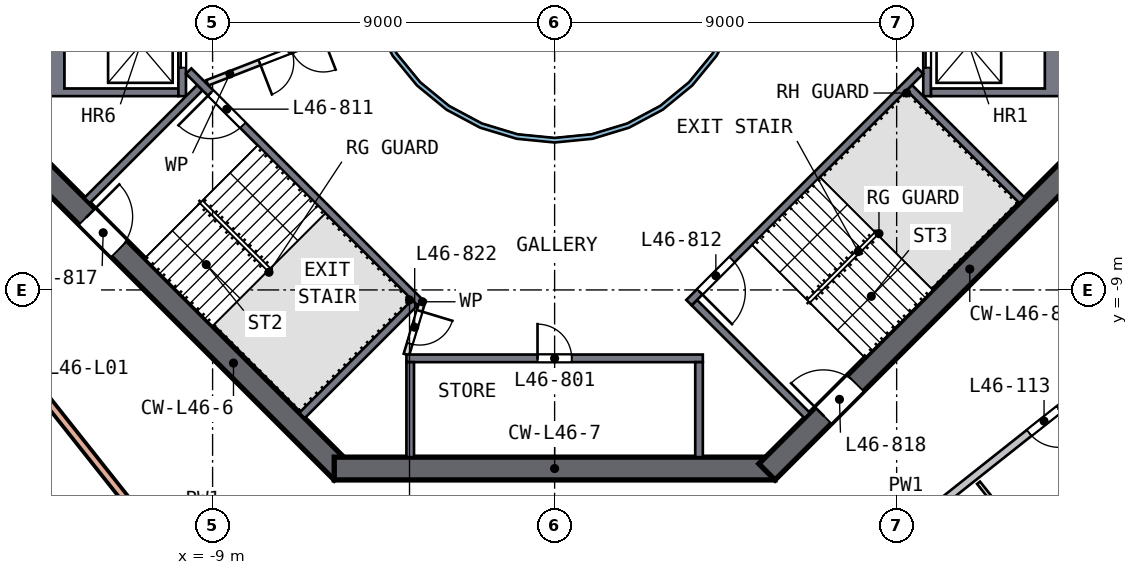
"""IFC4 building model, lengths in metres.
Left out: names, types, materials, properties, quantities, classifications, styles, units other than length and angle.
Written with IfcOpenShell. Run it as: python <this file> out.ifc"""

import sys

from ifc_helpers import new_model, si_unit, direction, frame, frame_2d, origin, place, context, subcontext, project, spatial, polyline, rectangle, outline, extrude, element, fill, save


model = new_model("IFC4")
c1 = context("Model", 3, precision=1e-05, world=origin(), true_north=direction((0.0, 1.0)))
c2 = subcontext(c1, "Body", "Model", "MODEL_VIEW")
j1 = project(units=[si_unit("LENGTHUNIT", "METRE"), si_unit("PLANEANGLEUNIT", "RADIAN")], contexts=[c1])
p1 = place(None, origin())
s1 = spatial("IfcSite", under=j1, at=p1, CompositionType="ELEMENT")
p2 = place(p1, origin())
s2 = spatial("IfcBuilding", under=s1, at=p2, CompositionType="ELEMENT")
p3 = place(p2, frame((0.0, 0.0, 190.5)))
s3 = spatial("IfcBuildingStorey", under=s2, at=p3, CompositionType="ELEMENT", Elevation=190.5)
p4 = place(p3, frame((-13.788, -5.587, 0.0), z_axis=(0.0, 0.0, 1.0), x_axis=(0.707106781, -0.707106781, 0.0)))
e1 = element("IfcWall", 1, at=p4, inside=s3, PredefinedType="SHEAR", context=c2, shape_type="SweptSolid", body=[
    extrude(rectangle(XDim=11.598, YDim=0.6, at=frame_2d((5.799, 0.0))), origin(), (0.0, 0.0, 1.0), 3.5),
])
p5 = place(p4, frame((2.099, 0.0, 0.0)))
e2 = element("IfcOpeningElement", 2, at=p5, cuts=e1, PredefinedType="OPENING", context=c2, shape_type="SweptSolid", body=[
    extrude(rectangle(XDim=1.2, YDim=2.1, at=frame_2d((0.6, 1.05))), frame((0.0, 0.31, 0.0), z_axis=(0.0, -1.0, 0.0), x_axis=(1.0, 0.0, 0.0)), (0.0, 0.0, 1.0), 0.62),
])
p6 = place(p3, frame((-5.799, -13.7, 0.0), z_axis=(0.0, 0.0, 1.0), x_axis=(1.0, 0.0, 0.0)))
e3 = element("IfcWall", 3, at=p6, inside=s3, PredefinedType="SHEAR", context=c2, shape_type="SweptSolid", body=[
    extrude(rectangle(XDim=11.598, YDim=0.6, at=frame_2d((5.799, 0.0))), origin(), (0.0, 0.0, 1.0), 3.5),
])
p7 = place(p3, frame((5.587, -13.788, 0.0), z_axis=(0.0, 0.0, 1.0), x_axis=(0.707106781, 0.707106781, 0.0)))
e4 = element("IfcWall", 4, at=p7, inside=s3, PredefinedType="SHEAR", context=c2, shape_type="SweptSolid", body=[
    extrude(rectangle(XDim=11.598, YDim=0.6, at=frame_2d((5.799, 0.0))), origin(), (0.0, 0.0, 1.0), 3.5),
])
p8 = place(p7, frame((2.099, 0.0, 0.0)))
e5 = element("IfcOpeningElement", 5, at=p8, cuts=e4, PredefinedType="OPENING", context=c2, shape_type="SweptSolid", body=[
    extrude(rectangle(XDim=1.2, YDim=2.1, at=frame_2d((0.6, 1.05))), frame((0.0, 0.31, 0.0), z_axis=(0.0, -1.0, 0.0), x_axis=(1.0, 0.0, 0.0)), (0.0, 0.0, 1.0), 0.62),
])
p9 = place(p3, frame((-9.958, -16.187, 0.0), z_axis=(0.0, 0.0, 1.0), x_axis=(-0.621141056, 0.783698787, 0.0)))
e6 = element("IfcWall", 6, at=p9, inside=s3, PredefinedType="SOLIDWALL", context=c2, shape_type="SweptSolid", body=[
    extrude(rectangle(XDim=13.0, YDim=0.2, at=frame_2d((6.5, 0.0))), origin(), (0.0, 0.0, 1.0), 3.19),
])
p10 = place(p9, frame((5.6, 0.0, 0.0)))
e7 = element("IfcOpeningElement", 7, at=p10, cuts=e6, PredefinedType="OPENING", context=c2, shape_type="SweptSolid", body=[
    extrude(rectangle(XDim=1.8, YDim=2.4, at=frame_2d((0.9, 1.2))), frame((0.0, 0.11, 0.0), z_axis=(0.0, -1.0, 0.0), x_axis=(1.0, 0.0, 0.0)), (0.0, 0.0, 1.0), 0.22),
])
p11 = place(p3, origin())
e8 = element("IfcWall", 8, at=p11, inside=s3, PredefinedType="SOLIDWALL", context=c2, shape_type="SweptSolid", body=[
    extrude(outline(polyline([(13.4, -3.9), (9.9, -3.9), (9.9, -3.7), (12.9, -3.7), (12.9, -1.4), (9.9, -1.4), (9.9, -1.2), (13.4, -1.2), (13.4, -3.9)])), origin(), (0.0, 0.0, 1.0), 3.19),
])
p12 = place(p3, frame((9.8, -1.2, 0.0), z_axis=(0.0, 0.0, 1.0), x_axis=(0.0, -1.0, 0.0)))
e9 = element("IfcWall", 9, at=p12, inside=s3, PredefinedType="SOLIDWALL", context=c2, shape_type="SweptSolid", body=[
    extrude(rectangle(XDim=2.7, YDim=0.2, at=frame_2d((1.35, 0.0))), origin(), (0.0, 0.0, 1.0), 3.19),
])
p13 = place(p12, frame((0.75, 0.0, 0.0)))
e10 = element("IfcOpeningElement", 10, at=p13, cuts=e9, PredefinedType="OPENING", context=c2, shape_type="SweptSolid", body=[
    extrude(rectangle(XDim=1.2, YDim=2.1, at=frame_2d((0.6, 1.05))), frame((0.0, 0.11, 0.0), z_axis=(0.0, -1.0, 0.0), x_axis=(1.0, 0.0, 0.0)), (0.0, 0.0, 1.0), 0.22),
])
p14 = place(p3, origin())
e11 = element("IfcWall", 11, at=p14, inside=s3, PredefinedType="SOLIDWALL", context=c2, shape_type="SweptSolid", body=[
    extrude(outline(polyline([(-13.4, -3.9), (-13.4, -1.2), (-9.9, -1.2), (-9.9, -1.4), (-12.9, -1.4), (-12.9, -3.7), (-9.9, -3.7), (-9.9, -3.9), (-13.4, -3.9)])), origin(), (0.0, 0.0, 1.0), 3.19),
])
p15 = place(p3, frame((-9.8, -1.2, 0.0), z_axis=(0.0, 0.0, 1.0), x_axis=(0.0, -1.0, 0.0)))
e12 = element("IfcWall", 12, at=p15, inside=s3, PredefinedType="SOLIDWALL", context=c2, shape_type="SweptSolid", body=[
    extrude(rectangle(XDim=2.7, YDim=0.2, at=frame_2d((1.35, 0.0))), origin(), (0.0, 0.0, 1.0), 3.19),
])
p16 = place(p15, frame((0.75, 0.0, 0.0)))
e13 = element("IfcOpeningElement", 13, at=p16, cuts=e12, PredefinedType="OPENING", context=c2, shape_type="SweptSolid", body=[
    extrude(rectangle(XDim=1.2, YDim=2.1, at=frame_2d((0.6, 1.05))), frame((0.0, 0.11, 0.0), z_axis=(0.0, -1.0, 0.0), x_axis=(1.0, 0.0, 0.0)), (0.0, 0.0, 1.0), 0.22),
])
p17 = place(p3, frame((-3.9, -10.8, 0.0), z_axis=(0.0, 0.0, 1.0), x_axis=(1.0, 0.0, 0.0)))
e14 = element("IfcWall", 14, at=p17, inside=s3, PredefinedType="SOLIDWALL", context=c2, shape_type="SweptSolid", body=[
    extrude(rectangle(XDim=7.8, YDim=0.2, at=frame_2d((3.9, 0.0))), origin(), (0.0, 0.0, 1.0), 3.19),
])
p18 = place(p17, frame((3.45, 0.0, 0.0)))
e15 = element("IfcOpeningElement", 15, at=p18, cuts=e14, PredefinedType="OPENING", context=c2, shape_type="SweptSolid", body=[
    extrude(rectangle(XDim=0.9, YDim=2.1, at=frame_2d((0.45, 1.05))), frame((0.0, 0.11, 0.0), z_axis=(0.0, -1.0, 0.0), x_axis=(1.0, 0.0, 0.0)), (0.0, 0.0, 1.0), 0.22),
])
for number, where, z_axis, x_axis in (
    (16, (-3.8, -10.9, 0.0), (0.0, 0.0, 1.0), (0.0, -1.0, 0.0)),
    (17, (3.8, -10.9, 0.0), (0.0, 0.0, 1.0), (0.0, -1.0, 0.0)),
):
    element("IfcWall", number, at=place(p3, frame(where, z_axis=z_axis, x_axis=x_axis)), inside=s3, PredefinedType="SOLIDWALL", context=c2, shape_type="SweptSolid", body=[
        extrude(rectangle(XDim=2.5, YDim=0.2, at=frame_2d((1.25, 0.0))), origin(), (0.0, 0.0, 1.0), 3.19),
    ])
p19 = place(p3, frame((-3.535, -9.334, 0.0), z_axis=(0.0, 0.0, 1.0), x_axis=(-0.707120946, 0.707092617, 0.0)))
e18 = element("IfcWall", 18, at=p19, inside=s3, PredefinedType="SOLIDWALL", context=c2, shape_type="SweptSolid", body=[
    extrude(rectangle(XDim=8.618, YDim=0.2, at=frame_2d((4.309, 0.0))), origin(), (0.0, 0.0, 1.0), 3.19),
])
p20 = place(p19, frame((6.6, 0.0, 0.0)))
e19 = element("IfcOpeningElement", 19, at=p20, cuts=e18, PredefinedType="OPENING", context=c2, shape_type="SweptSolid", body=[
    extrude(rectangle(XDim=1.2, YDim=2.1, at=frame_2d((0.6, 1.05))), frame((0.0, 0.11, 0.0), z_axis=(0.0, -1.0, 0.0), x_axis=(1.0, 0.0, 0.0)), (0.0, 0.0, 1.0), 0.22),
])
for number, where, z_axis, x_axis in (
    (20, (-9.334, -3.677, 0.0), (0.0, 0.0, 1.0), (-0.707, -0.707, 0.0)),
    (21, (-3.677, -9.334, 0.0), (0.0, 0.0, 1.0), (-0.707, -0.707, 0.0)),
):
    element("IfcWall", number, at=place(p3, frame(where, z_axis=z_axis, x_axis=x_axis)), inside=s3, PredefinedType="SOLIDWALL", context=c2, shape_type="SweptSolid", body=[
        extrude(rectangle(XDim=4.2, YDim=0.2, at=frame_2d((2.1, 0.0))), origin(), (0.0, 0.0, 1.0), 3.19),
    ])
p21 = place(p3, frame((9.629, -3.24, 0.0), z_axis=(0.0, 0.0, 1.0), x_axis=(-0.707120946, -0.707092617, 0.0)))
e22 = element("IfcWall", 22, at=p21, inside=s3, PredefinedType="SOLIDWALL", context=c2, shape_type="SweptSolid", body=[
    extrude(rectangle(XDim=8.618, YDim=0.2, at=frame_2d((4.309, 0.0))), origin(), (0.0, 0.0, 1.0), 3.19),
])
p22 = place(p21, frame((7.018, 0.0, 0.0)))
e23 = element("IfcOpeningElement", 23, at=p22, cuts=e22, PredefinedType="OPENING", context=c2, shape_type="SweptSolid", body=[
    extrude(rectangle(XDim=1.2, YDim=2.1, at=frame_2d((0.6, 1.05))), frame((0.0, 0.11, 0.0), z_axis=(0.0, -1.0, 0.0), x_axis=(1.0, 0.0, 0.0)), (0.0, 0.0, 1.0), 0.22),
])
for number, where, z_axis, x_axis in (
    (24, (3.677, -9.334, 0.0), (0.0, 0.0, 1.0), (0.707, -0.707, 0.0)),
    (25, (9.334, -3.677, 0.0), (0.0, 0.0, 1.0), (0.707, -0.707, 0.0)),
):
    element("IfcWall", number, at=place(p3, frame(where, z_axis=z_axis, x_axis=x_axis)), inside=s3, PredefinedType="SOLIDWALL", context=c2, shape_type="SweptSolid", body=[
        extrude(rectangle(XDim=4.2, YDim=0.2, at=frame_2d((2.1, 0.0))), origin(), (0.0, 0.0, 1.0), 3.19),
    ])
p23 = place(p3, frame((-3.465, -9.263, 0.0), z_axis=(0.0, 0.0, 1.0), x_axis=(-0.289808785, -0.957084567, 0.0)))
e26 = element("IfcWall", 26, at=p23, inside=s3, PredefinedType="PARTITIONING", context=c2, shape_type="SweptSolid", body=[
    extrude(rectangle(XDim=1.501, YDim=0.15, at=frame_2d((0.75, 0.0))), origin(), (0.0, 0.0, 1.0), 3.19),
])
p24 = place(p23, frame((0.301, 0.0, 0.0)))
e27 = element("IfcOpeningElement", 27, at=p24, cuts=e26, PredefinedType="OPENING", context=c2, shape_type="SweptSolid", body=[
    extrude(rectangle(XDim=0.9, YDim=2.1, at=frame_2d((0.45, 1.05))), frame((0.0, 0.085, 0.0), z_axis=(0.0, -1.0, 0.0), x_axis=(1.0, 0.0, 0.0)), (0.0, 0.0, 1.0), 0.17),
])
p25 = place(p3, frame((-4.782, -1.857, 0.0), z_axis=(0.0, 0.0, 1.0), x_axis=(-0.932157474, -0.362053096, 0.0)))
e28 = element("IfcWall", 28, at=p25, inside=s3, PredefinedType="PARTITIONING", context=c2, shape_type="SweptSolid", body=[
    extrude(rectangle(XDim=4.675, YDim=0.15, at=frame_2d((2.337, 0.0))), origin(), (0.0, 0.0, 1.0), 3.19),
])
p26 = place(p25, frame((1.4, 0.0, 0.0)))
e29 = element("IfcOpeningElement", 29, at=p26, cuts=e28, PredefinedType="OPENING", context=c2, shape_type="SweptSolid", body=[
    extrude(rectangle(XDim=1.8, YDim=2.1, at=frame_2d((0.9, 1.05))), frame((0.0, 0.085, 0.0), z_axis=(0.0, -1.0, 0.0), x_axis=(1.0, 0.0, 0.0)), (0.0, 0.0, 1.0), 0.17),
])
p27 = place(p3, origin())
e30 = element("IfcWall", 30, at=p27, inside=s3, PredefinedType="SOLIDWALL", context=c2, shape_type="SweptSolid", body=[
    extrude(outline(polyline([(5.021, -0.999), (4.73, -1.959), (4.257, -2.844), (3.62, -3.62), (2.844, -4.257), (1.959, -4.73), (0.999, -5.021), (0.0, -5.12), (-0.999, -5.021), (-1.959, -4.73), (-2.844, -4.257), (-3.62, -3.62), (-4.257, -2.844), (-4.73, -1.959), (-5.021, -0.999), (-5.12, 0.0), (-5.021, 0.999), (-4.73, 1.959), (-4.257, 2.844), (-3.62, 3.62), (-2.844, 4.257), (-1.959, 4.73), (-0.999, 5.021), (0.0, 5.12), (0.999, 5.021), (1.959, 4.73), (2.844, 4.257), (3.62, 3.62), (4.257, 2.844), (4.73, 1.959), (5.021, 0.999), (5.12, 0.0), (5.021, -0.999)]), holes=[polyline([(4.904, 0.976), (4.619, 1.913), (4.157, 2.778), (3.535, 3.535), (2.778, 4.157), (1.913, 4.619), (0.976, 4.904), (0.0, 5.0), (-0.976, 4.904), (-1.913, 4.619), (-2.778, 4.157), (-3.535, 3.535), (-4.157, 2.778), (-4.619, 1.913), (-4.904, 0.976), (-5.0, 0.0), (-4.904, -0.976), (-4.619, -1.913), (-4.157, -2.778), (-3.535, -3.535), (-2.778, -4.157), (-1.913, -4.619), (-0.976, -4.904), (0.0, -5.0), (0.976, -4.904), (1.913, -4.619), (2.778, -4.157), (3.535, -3.535), (4.157, -2.778), (4.619, -1.913), (4.904, -0.976), (5.0, 0.0), (4.904, 0.976)])]), origin(), (0.0, 0.0, 1.0), 3.19),
])
p28 = place(p3, frame((14.76, -10.961, 0.0), z_axis=(0.0, 0.0, 1.0), x_axis=(-0.783683297, -0.621160599, 0.0)))
e31 = element("IfcWall", 31, at=p28, inside=s3, PredefinedType="SOLIDWALL", context=c2, shape_type="SweptSolid", body=[
    extrude(rectangle(XDim=9.317, YDim=0.2, at=frame_2d((4.658, 0.0))), origin(), (0.0, 0.0, 1.0), 3.19),
])
p29 = place(p28, frame((1.9, 0.0, 0.0)))
e32 = element("IfcOpeningElement", 32, at=p29, cuts=e31, PredefinedType="OPENING", context=c2, shape_type="SweptSolid", body=[
    extrude(rectangle(XDim=1.0, YDim=2.1, at=frame_2d((0.5, 1.05))), frame((0.0, 0.11, 0.0), z_axis=(0.0, -1.0, 0.0), x_axis=(1.0, 0.0, 0.0)), (0.0, 0.0, 1.0), 0.22),
])
p30 = place(p3, frame((14.975, -18.894, 0.0), z_axis=(0.0, 0.0, 1.0), x_axis=(-0.621140066, 0.783699571, 0.0)))
e33 = element("IfcWall", 33, at=p30, inside=s3, PredefinedType="PARTITIONING", context=c2, shape_type="SweptSolid", body=[
    extrude(rectangle(XDim=6.15, YDim=0.1, at=frame_2d((3.075, 0.0))), origin(), (0.0, 0.0, 1.0), 3.19),
])
p31 = place(p30, frame((1.8, 0.0, 0.0)))
e34 = element("IfcOpeningElement", 34, at=p31, cuts=e33, PredefinedType="OPENING", context=c2, shape_type="SweptSolid", body=[
    extrude(rectangle(XDim=1.0, YDim=2.1, at=frame_2d((0.5, 1.05))), frame((0.0, 0.06, 0.0), z_axis=(0.0, -1.0, 0.0), x_axis=(1.0, 0.0, 0.0)), (0.0, 0.0, 1.0), 0.12),
])
p32 = place(p18, origin())
e35 = element("IfcDoor", 35, at=p32, inside=s3, OperationType="SINGLE_SWING_LEFT", PredefinedType="DOOR", context=c2, shape_type="SweptSolid", body=[
    extrude(rectangle(XDim=0.9, YDim=2.1, at=frame_2d((0.45, 1.05))), frame((0.0, 0.025, 0.0), z_axis=(0.0, -1.0, 0.0), x_axis=(1.0, 0.0, 0.0)), (0.0, 0.0, 1.0), 0.05),
])
fill(e15, e35)
p33 = place(p13, origin())
e36 = element("IfcDoor", 36, at=p33, inside=s3, OperationType="DOUBLE_DOOR_SLIDING", PredefinedType="DOOR", context=c2, shape_type="SweptSolid", body=[
    extrude(rectangle(XDim=1.2, YDim=2.1, at=frame_2d((0.6, 1.05))), frame((0.0, 0.025, 0.0), z_axis=(0.0, -1.0, 0.0), x_axis=(1.0, 0.0, 0.0)), (0.0, 0.0, 1.0), 0.05),
])
fill(e10, e36)
p34 = place(p16, origin())
e37 = element("IfcDoor", 37, at=p34, inside=s3, OperationType="DOUBLE_DOOR_SLIDING", PredefinedType="DOOR", context=c2, shape_type="SweptSolid", body=[
    extrude(rectangle(XDim=1.2, YDim=2.1, at=frame_2d((0.6, 1.05))), frame((0.0, 0.025, 0.0), z_axis=(0.0, -1.0, 0.0), x_axis=(1.0, 0.0, 0.0)), (0.0, 0.0, 1.0), 0.05),
])
fill(e13, e37)
p35 = place(p20, origin())
e38 = element("IfcDoor", 38, at=p35, inside=s3, OperationType="SINGLE_SWING_RIGHT", PredefinedType="DOOR", context=c2, shape_type="SweptSolid", body=[
    extrude(rectangle(XDim=1.2, YDim=2.1, at=frame_2d((0.6, 1.05))), frame((0.0, 0.025, 0.0), z_axis=(0.0, -1.0, 0.0), x_axis=(1.0, 0.0, 0.0)), (0.0, 0.0, 1.0), 0.05),
])
fill(e19, e38)
p36 = place(p22, origin())
e39 = element("IfcDoor", 39, at=p36, inside=s3, OperationType="SINGLE_SWING_RIGHT", PredefinedType="DOOR", context=c2, shape_type="SweptSolid", body=[
    extrude(rectangle(XDim=1.2, YDim=2.1, at=frame_2d((0.6, 1.05))), frame((0.0, 0.025, 0.0), z_axis=(0.0, -1.0, 0.0), x_axis=(1.0, 0.0, 0.0)), (0.0, 0.0, 1.0), 0.05),
])
fill(e23, e39)
p37 = place(p5, origin())
e40 = element("IfcDoor", 40, at=p37, inside=s3, OperationType="SINGLE_SWING_LEFT", PredefinedType="DOOR", context=c2, shape_type="SweptSolid", body=[
    extrude(rectangle(XDim=1.2, YDim=2.1, at=frame_2d((0.6, 1.05))), frame((0.0, 0.025, 0.0), z_axis=(0.0, -1.0, 0.0), x_axis=(1.0, 0.0, 0.0)), (0.0, 0.0, 1.0), 0.05),
])
fill(e2, e40)
p38 = place(p8, origin())
e41 = element("IfcDoor", 41, at=p38, inside=s3, OperationType="SINGLE_SWING_LEFT", PredefinedType="DOOR", context=c2, shape_type="SweptSolid", body=[
    extrude(rectangle(XDim=1.2, YDim=2.1, at=frame_2d((0.6, 1.05))), frame((0.0, 0.025, 0.0), z_axis=(0.0, -1.0, 0.0), x_axis=(1.0, 0.0, 0.0)), (0.0, 0.0, 1.0), 0.05),
])
fill(e5, e41)
p39 = place(p24, origin())
e42 = element("IfcDoor", 42, at=p39, inside=s3, OperationType="SINGLE_SWING_LEFT", PredefinedType="DOOR", context=c2, shape_type="SweptSolid", body=[
    extrude(rectangle(XDim=0.9, YDim=2.1, at=frame_2d((0.45, 1.05))), frame((0.0, 0.025, 0.0), z_axis=(0.0, -1.0, 0.0), x_axis=(1.0, 0.0, 0.0)), (0.0, 0.0, 1.0), 0.05),
])
fill(e27, e42)
p40 = place(p26, origin())
e43 = element("IfcDoor", 43, at=p40, inside=s3, OperationType="DOUBLE_DOOR_SINGLE_SWING", PredefinedType="DOOR", context=c2, shape_type="SweptSolid", body=[
    extrude(rectangle(XDim=1.8, YDim=2.1, at=frame_2d((0.9, 1.05))), frame((0.0, 0.025, 0.0), z_axis=(0.0, -1.0, 0.0), x_axis=(1.0, 0.0, 0.0)), (0.0, 0.0, 1.0), 0.05),
])
fill(e29, e43)
p41 = place(p29, origin())
e44 = element("IfcDoor", 44, at=p41, inside=s3, OperationType="SINGLE_SWING_LEFT", PredefinedType="DOOR", context=c2, shape_type="SweptSolid", body=[
    extrude(rectangle(XDim=1.0, YDim=2.1, at=frame_2d((0.5, 1.05))), frame((0.0, 0.025, 0.0), z_axis=(0.0, -1.0, 0.0), x_axis=(1.0, 0.0, 0.0)), (0.0, 0.0, 1.0), 0.05),
])
fill(e32, e44)
save(model, sys.argv[1])
